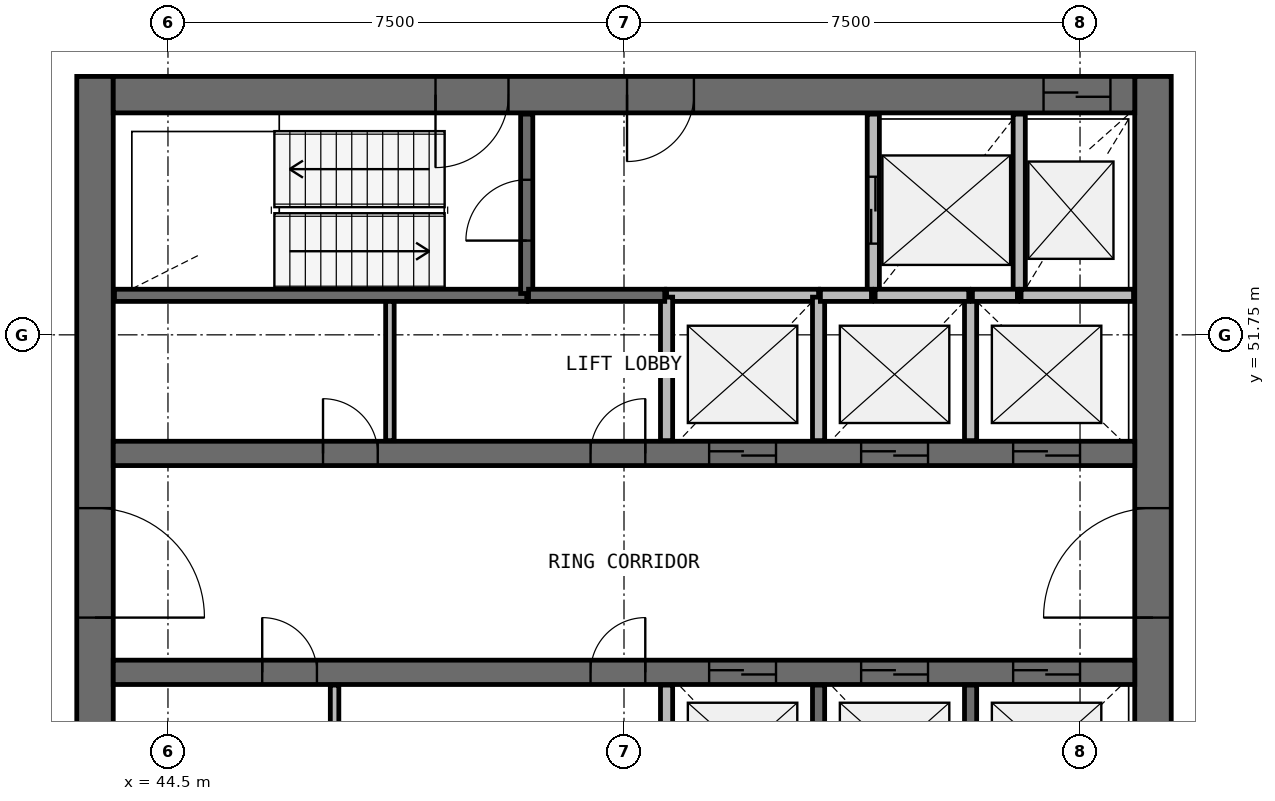
"""IFC4 building model, lengths in metres.
Left out: names, types, materials, properties, quantities, classifications, styles, units other than length and angle.
Written with IfcOpenShell. Run it as: python <this file> out.ifc"""

import sys

from ifc_helpers import new_model, si_unit, direction, frame, frame_2d, origin, place, context, subcontext, project, spatial, rectangle, extrude, source, transform, mapped, element, fill, save


model = new_model("IFC4")
c1 = context("Model", 3, precision=1e-05, world=origin(), true_north=direction((0.0, 1.0)))
c2 = subcontext(c1, "Body", "Model", "MODEL_VIEW")
j1 = project(units=[si_unit("LENGTHUNIT", "METRE"), si_unit("PLANEANGLEUNIT", "RADIAN")], contexts=[c1])
p1 = place(None, origin())
s1 = spatial("IfcSite", under=j1, at=p1, CompositionType="ELEMENT")
p2 = place(p1, origin())
s2 = spatial("IfcBuilding", under=s1, at=p2, CompositionType="ELEMENT")
p3 = place(p2, frame((0.0, 0.0, 203.3)))
s3 = spatial("IfcBuildingStorey", under=s2, at=p3, CompositionType="ELEMENT", Elevation=203.3)
p4 = place(p3, frame((60.7, 40.0, 0.0), z_axis=(0.0, 0.0, 1.0), x_axis=(0.0, 1.0, 0.0)))
e1 = element("IfcWall", 1, at=p4, inside=s3, PredefinedType="SHEAR", context=c2, shape_type="SweptSolid", body=[
    extrude(rectangle(XDim=16.0, YDim=0.6, at=frame_2d((8.0, 0.0))), origin(), (0.0, 0.0, 1.0), 3.9),
])
p5 = place(p4, frame((7.1, 0.0, 0.0)))
e2 = element("IfcOpeningElement", 2, at=p5, cuts=e1, PredefinedType="OPENING", context=c2, shape_type="SweptSolid", body=[
    extrude(rectangle(XDim=1.8, YDim=2.1, at=frame_2d((0.9, 1.05))), frame((0.0, 0.31, 0.0), z_axis=(0.0, -1.0, 0.0), x_axis=(1.0, 0.0, 0.0)), (0.0, 0.0, 1.0), 0.62),
])
p6 = place(p3, frame((43.3, 56.0, 0.0), z_axis=(0.0, 0.0, 1.0), x_axis=(0.0, -1.0, 0.0)))
e3 = element("IfcWall", 3, at=p6, inside=s3, PredefinedType="SHEAR", context=c2, shape_type="SweptSolid", body=[
    extrude(rectangle(XDim=16.0, YDim=0.6, at=frame_2d((8.0, 0.0))), origin(), (0.0, 0.0, 1.0), 3.9),
])
p7 = place(p6, frame((7.1, 0.0, 0.0)))
e4 = element("IfcOpeningElement", 4, at=p7, cuts=e3, PredefinedType="OPENING", context=c2, shape_type="SweptSolid", body=[
    extrude(rectangle(XDim=1.8, YDim=2.1, at=frame_2d((0.9, 1.05))), frame((0.0, 0.31, 0.0), z_axis=(0.0, -1.0, 0.0), x_axis=(1.0, 0.0, 0.0)), (0.0, 0.0, 1.0), 0.62),
])
p8 = place(p3, frame((60.4, 55.7, 0.0), z_axis=(0.0, 0.0, 1.0), x_axis=(-1.0, 0.0, 0.0)))
e5 = element("IfcWall", 5, at=p8, inside=s3, PredefinedType="SHEAR", context=c2, shape_type="SweptSolid", body=[
    extrude(rectangle(XDim=16.8, YDim=0.6, at=frame_2d((8.4, 0.0))), origin(), (0.0, 0.0, 1.0), 3.9),
])
p9 = place(p8, frame((0.4, 0.0, 0.0)))
e6 = element("IfcOpeningElement", 6, at=p9, cuts=e5, PredefinedType="OPENING", context=c2, shape_type="SweptSolid", body=[
    extrude(rectangle(XDim=1.1, YDim=2.1, at=frame_2d((0.55, 1.05))), frame((0.0, 0.31, 0.0), z_axis=(0.0, -1.0, 0.0), x_axis=(1.0, 0.0, 0.0)), (0.0, 0.0, 1.0), 0.62),
])
p10 = place(p8, frame((10.3, 0.0, 0.0)))
e7 = element("IfcOpeningElement", 7, at=p10, cuts=e5, PredefinedType="OPENING", context=c2, shape_type="SweptSolid", body=[
    extrude(rectangle(XDim=1.2, YDim=2.1, at=frame_2d((0.6, 1.05))), frame((0.0, 0.31, 0.0), z_axis=(0.0, -1.0, 0.0), x_axis=(1.0, 0.0, 0.0)), (0.0, 0.0, 1.0), 0.62),
])
p11 = place(p8, frame((7.25, 0.0, 0.0)))
e8 = element("IfcOpeningElement", 8, at=p11, cuts=e5, PredefinedType="OPENING", context=c2, shape_type="SweptSolid", body=[
    extrude(rectangle(XDim=1.1, YDim=2.1, at=frame_2d((0.55, 1.05))), frame((0.0, 0.31, 0.0), z_axis=(0.0, -1.0, 0.0), x_axis=(1.0, 0.0, 0.0)), (0.0, 0.0, 1.0), 0.62),
])
p12 = place(p3, frame((43.6, 49.8, 0.0), z_axis=(0.0, 0.0, 1.0), x_axis=(1.0, 0.0, 0.0)))
e9 = element("IfcWall", 9, at=p12, inside=s3, PredefinedType="SHEAR", context=c2, shape_type="SweptSolid", body=[
    extrude(rectangle(XDim=16.8, YDim=0.4, at=frame_2d((8.4, 0.0))), origin(), (0.0, 0.0, 1.0), 3.9),
])
p13 = place(p12, frame((9.8, 0.0, 0.0)))
e10 = element("IfcOpeningElement", 10, at=p13, cuts=e9, PredefinedType="OPENING", context=c2, shape_type="SweptSolid", body=[
    extrude(rectangle(XDim=1.1, YDim=2.1, at=frame_2d((0.55, 1.05))), frame((0.0, 0.21, 0.0), z_axis=(0.0, -1.0, 0.0), x_axis=(1.0, 0.0, 0.0)), (0.0, 0.0, 1.0), 0.42),
])
p14 = place(p12, frame((12.3, 0.0, 0.0)))
e11 = element("IfcOpeningElement", 11, at=p14, cuts=e9, PredefinedType="OPENING", context=c2, shape_type="SweptSolid", body=[
    extrude(rectangle(XDim=1.1, YDim=2.1, at=frame_2d((0.55, 1.05))), frame((0.0, 0.21, 0.0), z_axis=(0.0, -1.0, 0.0), x_axis=(1.0, 0.0, 0.0)), (0.0, 0.0, 1.0), 0.42),
])
p15 = place(p12, frame((14.8, 0.0, 0.0)))
e12 = element("IfcOpeningElement", 12, at=p15, cuts=e9, PredefinedType="OPENING", context=c2, shape_type="SweptSolid", body=[
    extrude(rectangle(XDim=1.1, YDim=2.1, at=frame_2d((0.55, 1.05))), frame((0.0, 0.21, 0.0), z_axis=(0.0, -1.0, 0.0), x_axis=(1.0, 0.0, 0.0)), (0.0, 0.0, 1.0), 0.42),
])
p16 = place(p12, frame((3.45, 0.0, 0.0)))
e13 = element("IfcOpeningElement", 13, at=p16, cuts=e9, PredefinedType="OPENING", context=c2, shape_type="SweptSolid", body=[
    extrude(rectangle(XDim=0.9, YDim=2.1, at=frame_2d((0.45, 1.05))), frame((0.0, 0.21, 0.0), z_axis=(0.0, -1.0, 0.0), x_axis=(1.0, 0.0, 0.0)), (0.0, 0.0, 1.0), 0.42),
])
p17 = place(p12, frame((7.85, 0.0, 0.0)))
e14 = element("IfcOpeningElement", 14, at=p17, cuts=e9, PredefinedType="OPENING", context=c2, shape_type="SweptSolid", body=[
    extrude(rectangle(XDim=0.9, YDim=2.1, at=frame_2d((0.45, 1.05))), frame((0.0, 0.21, 0.0), z_axis=(0.0, -1.0, 0.0), x_axis=(1.0, 0.0, 0.0)), (0.0, 0.0, 1.0), 0.42),
])
p18 = place(p3, frame((43.6, 46.2, 0.0), z_axis=(0.0, 0.0, 1.0), x_axis=(1.0, 0.0, 0.0)))
e15 = element("IfcWall", 15, at=p18, inside=s3, PredefinedType="SHEAR", context=c2, shape_type="SweptSolid", body=[
    extrude(rectangle(XDim=16.8, YDim=0.4, at=frame_2d((8.4, 0.0))), origin(), (0.0, 0.0, 1.0), 3.9),
])
p19 = place(p18, frame((9.8, 0.0, 0.0)))
e16 = element("IfcOpeningElement", 16, at=p19, cuts=e15, PredefinedType="OPENING", context=c2, shape_type="SweptSolid", body=[
    extrude(rectangle(XDim=1.1, YDim=2.1, at=frame_2d((0.55, 1.05))), frame((0.0, 0.21, 0.0), z_axis=(0.0, -1.0, 0.0), x_axis=(1.0, 0.0, 0.0)), (0.0, 0.0, 1.0), 0.42),
])
p20 = place(p18, frame((12.3, 0.0, 0.0)))
e17 = element("IfcOpeningElement", 17, at=p20, cuts=e15, PredefinedType="OPENING", context=c2, shape_type="SweptSolid", body=[
    extrude(rectangle(XDim=1.1, YDim=2.1, at=frame_2d((0.55, 1.05))), frame((0.0, 0.21, 0.0), z_axis=(0.0, -1.0, 0.0), x_axis=(1.0, 0.0, 0.0)), (0.0, 0.0, 1.0), 0.42),
])
p21 = place(p18, frame((14.8, 0.0, 0.0)))
e18 = element("IfcOpeningElement", 18, at=p21, cuts=e15, PredefinedType="OPENING", context=c2, shape_type="SweptSolid", body=[
    extrude(rectangle(XDim=1.1, YDim=2.1, at=frame_2d((0.55, 1.05))), frame((0.0, 0.21, 0.0), z_axis=(0.0, -1.0, 0.0), x_axis=(1.0, 0.0, 0.0)), (0.0, 0.0, 1.0), 0.42),
])
p22 = place(p18, frame((2.45, 0.0, 0.0)))
e19 = element("IfcOpeningElement", 19, at=p22, cuts=e15, PredefinedType="OPENING", context=c2, shape_type="SweptSolid", body=[
    extrude(rectangle(XDim=0.9, YDim=2.1, at=frame_2d((0.45, 1.05))), frame((0.0, 0.21, 0.0), z_axis=(0.0, -1.0, 0.0), x_axis=(1.0, 0.0, 0.0)), (0.0, 0.0, 1.0), 0.42),
])
p23 = place(p18, frame((7.85, 0.0, 0.0)))
e20 = element("IfcOpeningElement", 20, at=p23, cuts=e15, PredefinedType="OPENING", context=c2, shape_type="SweptSolid", body=[
    extrude(rectangle(XDim=0.9, YDim=2.1, at=frame_2d((0.45, 1.05))), frame((0.0, 0.21, 0.0), z_axis=(0.0, -1.0, 0.0), x_axis=(1.0, 0.0, 0.0)), (0.0, 0.0, 1.0), 0.42),
])
p24 = place(p3, frame((43.62, 52.4, 0.0), z_axis=(0.0, 0.0, 1.0), x_axis=(1.0, 0.0, 0.0)))
e21 = element("IfcWall", 21, at=p24, inside=s3, PredefinedType="SOLIDWALL", context=c2, shape_type="SweptSolid", body=[
    extrude(rectangle(XDim=6.78, YDim=0.2, at=frame_2d((3.39, 0.0))), origin(), (0.0, 0.0, 1.0), 3.58),
])
p25 = place(p3, frame((50.4, 52.43, 0.0), z_axis=(0.0, 0.0, 1.0), x_axis=(0.0, 1.0, 0.0)))
e22 = element("IfcWall", 22, at=p25, inside=s3, PredefinedType="SOLIDWALL", context=c2, shape_type="SweptSolid", body=[
    extrude(rectangle(XDim=2.95, YDim=0.2, at=frame_2d((1.475, 0.0))), origin(), (0.0, 0.0, 1.0), 3.58),
])
p26 = place(p25, frame((0.87, 0.0, 0.0)))
e23 = element("IfcOpeningElement", 23, at=p26, cuts=e22, PredefinedType="OPENING", context=c2, shape_type="SweptSolid", body=[
    extrude(rectangle(XDim=1.0, YDim=2.1, at=frame_2d((0.5, 1.05))), frame((0.0, 0.11, 0.0), z_axis=(0.0, -1.0, 0.0), x_axis=(1.0, 0.0, 0.0)), (0.0, 0.0, 1.0), 0.22),
])
p27 = place(p3, frame((56.1, 55.38, 0.0), z_axis=(0.0, 0.0, 1.0), x_axis=(0.0, -1.0, 0.0)))
e24 = element("IfcWall", 24, at=p27, inside=s3, PredefinedType="SOLIDWALL", context=c2, shape_type="SweptSolid", body=[
    extrude(rectangle(XDim=2.98, YDim=0.2, at=frame_2d((1.49, 0.0))), origin(), (0.0, 0.0, 1.0), 3.58),
])
p28 = place(p27, frame((1.03, 0.0, 0.0)))
e25 = element("IfcOpeningElement", 25, at=p28, cuts=e24, PredefinedType="OPENING", context=c2, shape_type="SweptSolid", body=[
    extrude(rectangle(XDim=1.1, YDim=2.1, at=frame_2d((0.55, 1.05))), frame((0.0, 0.11, 0.0), z_axis=(0.0, -1.0, 0.0), x_axis=(1.0, 0.0, 0.0)), (0.0, 0.0, 1.0), 0.22),
])
p29 = place(p3, frame((58.5, 52.4, 0.0), z_axis=(0.0, 0.0, 1.0), x_axis=(0.0, 1.0, 0.0)))
e26 = element("IfcWall", 26, at=p29, inside=s3, PredefinedType="SOLIDWALL", context=c2, shape_type="SweptSolid", body=[
    extrude(rectangle(XDim=2.98, YDim=0.2, at=frame_2d((1.49, 0.0))), origin(), (0.0, 0.0, 1.0), 3.58),
])
p30 = place(p3, frame((55.2, 52.4, 0.0), z_axis=(0.0, 0.0, 1.0), x_axis=(-1.0, 0.0, 0.0)))
e27 = element("IfcWall", 27, at=p30, inside=s3, PredefinedType="SOLIDWALL", context=c2, shape_type="SweptSolid", body=[
    extrude(rectangle(XDim=2.5, YDim=0.2, at=frame_2d((1.25, 0.0))), origin(), (0.0, 0.0, 1.0), 3.58),
])
for number, where, z_axis, x_axis in (
    (28, (52.7, 45.99, 0.0), (0.0, 0.0, 1.0), (0.0, -1.0, 0.0)),
    (29, (52.7, 52.37, 0.0), (0.0, 0.0, 1.0), (0.0, -1.0, 0.0)),
    (30, (55.2, 43.63, 0.0), (0.0, 0.0, 1.0), (0.0, 1.0, 0.0)),
    (31, (55.2, 50.01, 0.0), (0.0, 0.0, 1.0), (0.0, 1.0, 0.0)),
    (32, (57.7, 43.63, 0.0), (0.0, 0.0, 1.0), (0.0, 1.0, 0.0)),
):
    element("IfcWall", number, at=place(p3, frame(where, z_axis=z_axis, x_axis=x_axis)), inside=s3, PredefinedType="SOLIDWALL", context=c2, shape_type="SweptSolid", body=[
        extrude(rectangle(XDim=2.36, YDim=0.2, at=frame_2d((1.18, 0.0))), origin(), (0.0, 0.0, 1.0), 3.58),
    ])
p31 = place(p3, frame((57.7, 50.01, 0.0), z_axis=(0.0, 0.0, 1.0), x_axis=(0.0, 1.0, 0.0)))
e33 = element("IfcWall", 33, at=p31, inside=s3, PredefinedType="SOLIDWALL", context=c2, shape_type="SweptSolid", body=[
    extrude(rectangle(XDim=2.39, YDim=0.2, at=frame_2d((1.195, 0.0))), origin(), (0.0, 0.0, 1.0), 3.58),
])
p32 = place(p3, frame((50.43, 52.4, 0.0), z_axis=(0.0, 0.0, 1.0), x_axis=(1.0, 0.0, 0.0)))
e34 = element("IfcWall", 34, at=p32, inside=s3, PredefinedType="SOLIDWALL", context=c2, shape_type="SweptSolid", body=[
    extrude(rectangle(XDim=2.24, YDim=0.2, at=frame_2d((1.12, 0.0))), origin(), (0.0, 0.0, 1.0), 3.58),
])
p33 = place(p3, frame((60.38, 52.4, 0.0), z_axis=(0.0, 0.0, 1.0), x_axis=(-1.0, 0.0, 0.0)))
e35 = element("IfcWall", 35, at=p33, inside=s3, PredefinedType="SOLIDWALL", context=c2, shape_type="SweptSolid", body=[
    extrude(rectangle(XDim=1.85, YDim=0.2, at=frame_2d((0.925, 0.0))), origin(), (0.0, 0.0, 1.0), 3.58),
])
p34 = place(p3, frame((57.67, 52.4, 0.0), z_axis=(0.0, 0.0, 1.0), x_axis=(-1.0, 0.0, 0.0)))
e36 = element("IfcWall", 36, at=p34, inside=s3, PredefinedType="SOLIDWALL", context=c2, shape_type="SweptSolid", body=[
    extrude(rectangle(XDim=1.54, YDim=0.2, at=frame_2d((0.77, 0.0))), origin(), (0.0, 0.0, 1.0), 3.58),
])
p35 = place(p3, frame((56.07, 52.4, 0.0), z_axis=(0.0, 0.0, 1.0), x_axis=(-1.0, 0.0, 0.0)))
e37 = element("IfcWall", 37, at=p35, inside=s3, PredefinedType="SOLIDWALL", context=c2, shape_type="SweptSolid", body=[
    extrude(rectangle(XDim=0.84, YDim=0.2, at=frame_2d((0.42, 0.0))), origin(), (0.0, 0.0, 1.0), 3.58),
])
p36 = place(p3, frame((58.47, 52.4, 0.0), z_axis=(0.0, 0.0, 1.0), x_axis=(-1.0, 0.0, 0.0)))
e38 = element("IfcWall", 38, at=p36, inside=s3, PredefinedType="SOLIDWALL", context=c2, shape_type="SweptSolid", body=[
    extrude(rectangle(XDim=0.74, YDim=0.2, at=frame_2d((0.37, 0.0))), origin(), (0.0, 0.0, 1.0), 3.58),
])
for number, where, z_axis, x_axis in (
    (39, (47.24, 43.7, 0.0), (0.0, 0.0, 1.0), (0.0, 1.0, 0.0)),
    (40, (48.15, 50.01, 0.0), (0.0, 0.0, 1.0), (0.0, 1.0, 0.0)),
):
    element("IfcWall", number, at=place(p3, frame(where, z_axis=z_axis, x_axis=x_axis)), inside=s3, PredefinedType="PARTITIONING", context=c2, shape_type="SweptSolid", body=[
        extrude(rectangle(XDim=2.29, YDim=0.14, at=frame_2d((1.145, 0.0))), origin(), (0.0, 0.0, 1.0), 2.88),
    ])
m1 = source(origin(), c2, "Body", "SweptSolid", [
    extrude(rectangle(XDim=1.8, YDim=2.1, at=frame_2d((0.9, 1.05))), frame((0.0, 0.025, 0.0), z_axis=(0.0, -1.0, 0.0), x_axis=(1.0, 0.0, 0.0)), (0.0, 0.0, 1.0), 0.05),
])
p37 = place(p7, origin())
e41 = element("IfcDoor", 41, at=p37, inside=s3, OperationType="SINGLE_SWING_RIGHT", PredefinedType="DOOR", context=c2, shape_type="MappedRepresentation", body=[
    mapped(m1, transform((0.0, 0.0, 0.0), scale=1.0)),
])
fill(e4, e41)
p38 = place(p5, origin())
e42 = element("IfcDoor", 42, at=p38, inside=s3, OperationType="SINGLE_SWING_LEFT", PredefinedType="DOOR", context=c2, shape_type="MappedRepresentation", body=[
    mapped(m1, transform((0.0, 0.0, 0.0), scale=1.0)),
])
fill(e2, e42)
m2 = source(origin(), c2, "Body", "SweptSolid", [
    extrude(rectangle(XDim=1.1, YDim=2.1, at=frame_2d((0.55, 1.05))), frame((0.0, 0.025, 0.0), z_axis=(0.0, -1.0, 0.0), x_axis=(1.0, 0.0, 0.0)), (0.0, 0.0, 1.0), 0.05),
])
p39 = place(p13, origin())
e43 = element("IfcDoor", 43, at=p39, inside=s3, OperationType="DOUBLE_DOOR_SLIDING", PredefinedType="USERDEFINED", context=c2, shape_type="MappedRepresentation", body=[
    mapped(m2, transform((0.0, 0.0, 0.0), scale=1.0)),
])
fill(e10, e43)
p40 = place(p14, origin())
e44 = element("IfcDoor", 44, at=p40, inside=s3, OperationType="DOUBLE_DOOR_SLIDING", PredefinedType="USERDEFINED", context=c2, shape_type="MappedRepresentation", body=[
    mapped(m2, transform((0.0, 0.0, 0.0), scale=1.0)),
])
fill(e11, e44)
p41 = place(p15, origin())
e45 = element("IfcDoor", 45, at=p41, inside=s3, OperationType="DOUBLE_DOOR_SLIDING", PredefinedType="USERDEFINED", context=c2, shape_type="MappedRepresentation", body=[
    mapped(m2, transform((0.0, 0.0, 0.0), scale=1.0)),
])
fill(e12, e45)
p42 = place(p19, origin())
e46 = element("IfcDoor", 46, at=p42, inside=s3, OperationType="DOUBLE_DOOR_SLIDING", PredefinedType="USERDEFINED", context=c2, shape_type="MappedRepresentation", body=[
    mapped(m2, transform((0.0, 0.0, 0.0), scale=1.0)),
])
fill(e16, e46)
p43 = place(p20, origin())
e47 = element("IfcDoor", 47, at=p43, inside=s3, OperationType="DOUBLE_DOOR_SLIDING", PredefinedType="USERDEFINED", context=c2, shape_type="MappedRepresentation", body=[
    mapped(m2, transform((0.0, 0.0, 0.0), scale=1.0)),
])
fill(e17, e47)
p44 = place(p21, origin())
e48 = element("IfcDoor", 48, at=p44, inside=s3, OperationType="DOUBLE_DOOR_SLIDING", PredefinedType="USERDEFINED", context=c2, shape_type="MappedRepresentation", body=[
    mapped(m2, transform((0.0, 0.0, 0.0), scale=1.0)),
])
fill(e18, e48)
p45 = place(p28, origin())
e49 = element("IfcDoor", 49, at=p45, inside=s3, OperationType="DOUBLE_DOOR_SLIDING", PredefinedType="USERDEFINED", context=c2, shape_type="MappedRepresentation", body=[
    mapped(m2, transform((0.0, 0.0, 0.0), scale=1.0)),
])
fill(e25, e49)
p46 = place(p9, origin())
e50 = element("IfcDoor", 50, at=p46, inside=s3, OperationType="DOUBLE_DOOR_SLIDING", PredefinedType="USERDEFINED", context=c2, shape_type="MappedRepresentation", body=[
    mapped(m2, transform((0.0, 0.0, 0.0), scale=1.0)),
])
fill(e6, e50)
m3 = source(origin(), c2, "Body", "SweptSolid", [
    extrude(rectangle(XDim=1.2, YDim=2.1, at=frame_2d((0.6, 1.05))), frame((0.0, 0.025, 0.0), z_axis=(0.0, -1.0, 0.0), x_axis=(1.0, 0.0, 0.0)), (0.0, 0.0, 1.0), 0.05),
])
p47 = place(p10, origin())
e51 = element("IfcDoor", 51, at=p47, inside=s3, OperationType="SINGLE_SWING_RIGHT", PredefinedType="DOOR", context=c2, shape_type="MappedRepresentation", body=[
    mapped(m3, transform((0.0, 0.0, 0.0), scale=1.0)),
])
fill(e7, e51)
m4 = source(origin(), c2, "Body", "SweptSolid", [
    extrude(rectangle(XDim=1.0, YDim=2.1, at=frame_2d((0.5, 1.05))), frame((0.0, 0.025, 0.0), z_axis=(0.0, -1.0, 0.0), x_axis=(1.0, 0.0, 0.0)), (0.0, 0.0, 1.0), 0.05),
])
p48 = place(p26, origin())
e52 = element("IfcDoor", 52, at=p48, inside=s3, OperationType="SINGLE_SWING_LEFT", PredefinedType="DOOR", context=c2, shape_type="MappedRepresentation", body=[
    mapped(m4, transform((0.0, 0.0, 0.0), scale=1.0)),
])
fill(e23, e52)
m5 = source(origin(), c2, "Body", "SweptSolid", [
    extrude(rectangle(XDim=1.1, YDim=2.1, at=frame_2d((0.55, 1.05))), frame((0.0, 0.025, 0.0), z_axis=(0.0, -1.0, 0.0), x_axis=(1.0, 0.0, 0.0)), (0.0, 0.0, 1.0), 0.05),
])
p49 = place(p11, origin())
e53 = element("IfcDoor", 53, at=p49, inside=s3, OperationType="SINGLE_SWING_RIGHT", PredefinedType="DOOR", context=c2, shape_type="MappedRepresentation", body=[
    mapped(m5, transform((0.0, 0.0, 0.0), scale=1.0)),
])
fill(e8, e53)
m6 = source(origin(), c2, "Body", "SweptSolid", [
    extrude(rectangle(XDim=0.9, YDim=2.1, at=frame_2d((0.45, 1.05))), frame((0.0, 0.025, 0.0), z_axis=(0.0, -1.0, 0.0), x_axis=(1.0, 0.0, 0.0)), (0.0, 0.0, 1.0), 0.05),
])
p50 = place(p16, origin())
e54 = element("IfcDoor", 54, at=p50, inside=s3, OperationType="SINGLE_SWING_LEFT", PredefinedType="DOOR", context=c2, shape_type="MappedRepresentation", body=[
    mapped(m6, transform((0.0, 0.0, 0.0), scale=1.0)),
])
fill(e13, e54)
p51 = place(p17, origin())
e55 = element("IfcDoor", 55, at=p51, inside=s3, OperationType="SINGLE_SWING_RIGHT", PredefinedType="DOOR", context=c2, shape_type="MappedRepresentation", body=[
    mapped(m6, transform((0.0, 0.0, 0.0), scale=1.0)),
])
fill(e14, e55)
p52 = place(p22, origin())
e56 = element("IfcDoor", 56, at=p52, inside=s3, OperationType="SINGLE_SWING_LEFT", PredefinedType="DOOR", context=c2, shape_type="MappedRepresentation", body=[
    mapped(m6, transform((0.0, 0.0, 0.0), scale=1.0)),
])
fill(e19, e56)
p53 = place(p23, origin())
e57 = element("IfcDoor", 57, at=p53, inside=s3, OperationType="SINGLE_SWING_RIGHT", PredefinedType="DOOR", context=c2, shape_type="MappedRepresentation", body=[
    mapped(m6, transform((0.0, 0.0, 0.0), scale=1.0)),
])
fill(e20, e57)
save(model, sys.argv[1])
